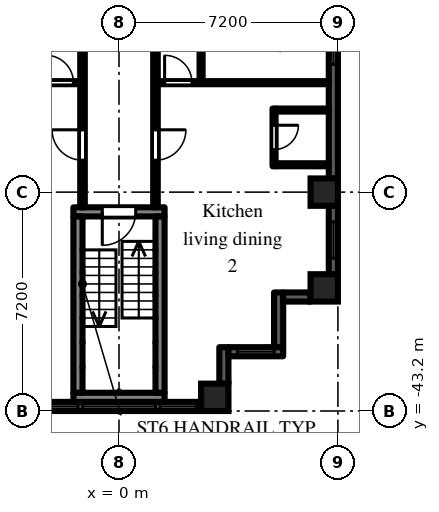
"""IFC4 building model, lengths in metres.
Left out: names, types, materials, properties, quantities, classifications, styles, units other than length and angle.
Written with IfcOpenShell. Run it as: python <this file> out.ifc"""

import sys

from ifc_helpers import new_model, si_unit, direction, frame, frame_2d, origin, origin_2d, place, context, subcontext, project, spatial, rectangle, extrude, element, fill, save


model = new_model("IFC4")
c1 = context("Model", 3, precision=1e-05, world=origin(), true_north=direction((0.0, 1.0)))
c2 = subcontext(c1, "Body", "Model", "MODEL_VIEW")
j1 = project(units=[si_unit("LENGTHUNIT", "METRE"), si_unit("PLANEANGLEUNIT", "RADIAN")], contexts=[c1])
p1 = place(None, origin())
s1 = spatial("IfcSite", under=j1, at=p1, CompositionType="ELEMENT")
p2 = place(p1, origin())
s2 = spatial("IfcBuilding", under=s1, at=p2, CompositionType="ELEMENT")
p3 = place(p2, frame((0.0, 0.0, 53.7)))
s3 = spatial("IfcBuildingStorey", under=s2, at=p3, CompositionType="ELEMENT", Elevation=53.7)
for number, where, z_axis, x_axis in (
    (1, (3.15, -42.75, 0.0), (0.0, 0.0, 1.0), (1.0, 0.0, 0.0)),
    (2, (6.75, -39.15, 0.0), (0.0, 0.0, 1.0), (1.0, 0.0, 0.0)),
    (3, (6.75, -36.0, 0.0), (0.0, 0.0, 1.0), (1.0, 0.0, 0.0)),
):
    element("IfcColumn", number, at=place(p3, frame(where, z_axis=z_axis, x_axis=x_axis)), inside=s3, PredefinedType="COLUMN", context=c2, shape_type="SweptSolid", body=[
        extrude(rectangle(XDim=0.9, YDim=0.9, at=origin_2d()), origin(), (0.0, 0.0, 1.0), 3.0),
    ])
p4 = place(p3, frame((-2.7, -43.05, 0.0), z_axis=(0.0, 0.0, 1.0), x_axis=(1.0, 0.0, 0.0)))
e4 = element("IfcWall", 4, at=p4, inside=s3, PredefinedType="SOLIDWALL", context=c2, shape_type="SweptSolid", body=[
    extrude(rectangle(XDim=5.4, YDim=0.3, at=frame_2d((2.7, 0.0))), origin(), (0.0, 0.0, 1.0), 2.1),
])
p5 = place(p4, frame((1.5, 0.0, 0.2)))
e5 = element("IfcOpeningElement", 5, at=p5, cuts=e4, PredefinedType="OPENING", context=c2, shape_type="SweptSolid", body=[
    extrude(rectangle(XDim=2.4, YDim=1.85, at=frame_2d((1.2, 0.925))), frame((0.0, 0.16, 0.0), z_axis=(0.0, -1.0, 0.0), x_axis=(1.0, 0.0, 0.0)), (0.0, 0.0, 1.0), 0.32),
])
p6 = place(p4, frame((0.15, 0.0, 0.2)))
e6 = element("IfcOpeningElement", 6, at=p6, cuts=e4, PredefinedType="OPENING", context=c2, shape_type="SweptSolid", body=[
    extrude(rectangle(XDim=1.2, YDim=1.85, at=frame_2d((0.6, 0.925))), frame((0.0, 0.16, 0.0), z_axis=(0.0, -1.0, 0.0), x_axis=(1.0, 0.0, 0.0)), (0.0, 0.0, 1.0), 0.32),
])
p7 = place(p4, frame((4.05, 0.0, 0.2)))
e7 = element("IfcOpeningElement", 7, at=p7, cuts=e4, PredefinedType="OPENING", context=c2, shape_type="SweptSolid", body=[
    extrude(rectangle(XDim=1.2, YDim=1.85, at=frame_2d((0.6, 0.925))), frame((0.0, 0.16, 0.0), z_axis=(0.0, -1.0, 0.0), x_axis=(1.0, 0.0, 0.0)), (0.0, 0.0, 1.0), 0.32),
])
p8 = place(p3, frame((3.45, -42.3, 0.0), z_axis=(0.0, 0.0, 1.0), x_axis=(0.0, 1.0, 0.0)))
e8 = element("IfcWall", 8, at=p8, inside=s3, PredefinedType="SOLIDWALL", context=c2, shape_type="SweptSolid", body=[
    extrude(rectangle(XDim=1.2, YDim=0.3, at=frame_2d((0.6, 0.0))), origin(), (0.0, 0.0, 1.0), 2.575),
])
p9 = place(p3, frame((3.6, -41.25, 0.0), z_axis=(0.0, 0.0, 1.0), x_axis=(1.0, 0.0, 0.0)))
e9 = element("IfcWall", 9, at=p9, inside=s3, PredefinedType="SOLIDWALL", context=c2, shape_type="SweptSolid", body=[
    extrude(rectangle(XDim=1.8, YDim=0.3, at=frame_2d((0.9, 0.0))), origin(), (0.0, 0.0, 1.0), 2.575),
])
p10 = place(p9, frame((0.3, 0.0, 0.2)))
e10 = element("IfcOpeningElement", 10, at=p10, cuts=e9, PredefinedType="OPENING", context=c2, shape_type="SweptSolid", body=[
    extrude(rectangle(XDim=1.2, YDim=1.85, at=frame_2d((0.6, 0.925))), frame((0.0, 0.16, 0.0), z_axis=(0.0, -1.0, 0.0), x_axis=(1.0, 0.0, 0.0)), (0.0, 0.0, 1.0), 0.32),
])
p11 = place(p3, frame((5.25, -41.1, 0.0), z_axis=(0.0, 0.0, 1.0), x_axis=(0.0, 1.0, 0.0)))
e11 = element("IfcWall", 11, at=p11, inside=s3, PredefinedType="SOLIDWALL", context=c2, shape_type="SweptSolid", body=[
    extrude(rectangle(XDim=1.8, YDim=0.3, at=frame_2d((0.9, 0.0))), origin(), (0.0, 0.0, 1.0), 2.575),
])
p12 = place(p3, frame((5.4, -39.45, 0.0), z_axis=(0.0, 0.0, 1.0), x_axis=(1.0, 0.0, 0.0)))
e12 = element("IfcWall", 12, at=p12, inside=s3, PredefinedType="SOLIDWALL", context=c2, shape_type="SweptSolid", body=[
    extrude(rectangle(XDim=0.9, YDim=0.3, at=frame_2d((0.45, 0.0))), origin(), (0.0, 0.0, 1.0), 2.575),
])
p13 = place(p3, frame((7.05, -38.7, 0.0), z_axis=(0.0, 0.0, 1.0), x_axis=(0.0, 1.0, 0.0)))
e13 = element("IfcWall", 13, at=p13, inside=s3, PredefinedType="SOLIDWALL", context=c2, shape_type="SweptSolid", body=[
    extrude(rectangle(XDim=2.25, YDim=0.3, at=frame_2d((1.125, 0.0))), origin(), (0.0, 0.0, 1.0), 2.1),
])
p14 = place(p13, frame((0.525, 0.0, 0.2)))
e14 = element("IfcOpeningElement", 14, at=p14, cuts=e13, PredefinedType="OPENING", context=c2, shape_type="SweptSolid", body=[
    extrude(rectangle(XDim=1.2, YDim=1.85, at=frame_2d((0.6, 0.925))), frame((0.0, 0.16, 0.0), z_axis=(0.0, -1.0, 0.0), x_axis=(1.0, 0.0, 0.0)), (0.0, 0.0, 1.0), 0.32),
])
p15 = place(p3, frame((7.05, -35.55, 0.0), z_axis=(0.0, 0.0, 1.0), x_axis=(0.0, 1.0, 0.0)))
e15 = element("IfcWall", 15, at=p15, inside=s3, PredefinedType="SOLIDWALL", context=c2, shape_type="SweptSolid", body=[
    extrude(rectangle(XDim=6.3, YDim=0.3, at=frame_2d((3.15, 0.0))), origin(), (0.0, 0.0, 1.0), 2.1),
])
p16 = place(p15, frame((3.75, 0.0, 0.2)))
e16 = element("IfcOpeningElement", 16, at=p16, cuts=e15, PredefinedType="OPENING", context=c2, shape_type="SweptSolid", body=[
    extrude(rectangle(XDim=2.4, YDim=1.85, at=frame_2d((1.2, 0.925))), frame((0.0, 0.16, 0.0), z_axis=(0.0, -1.0, 0.0), x_axis=(1.0, 0.0, 0.0)), (0.0, 0.0, 1.0), 0.32),
])
p17 = place(p3, frame((-1.5, -36.65, 0.0), z_axis=(0.0, 0.0, 1.0), x_axis=(1.0, 0.0, 0.0)))
e17 = element("IfcWall", 17, at=p17, inside=s3, PredefinedType="SHEAR", context=c2, shape_type="SweptSolid", body=[
    extrude(rectangle(XDim=3.0, YDim=0.3, at=frame_2d((1.5, 0.0))), origin(), (0.0, 0.0, 1.0), 2.575),
])
p18 = place(p17, frame((0.95, 0.0, 0.0)))
e18 = element("IfcOpeningElement", 18, at=p18, cuts=e17, PredefinedType="OPENING", context=c2, shape_type="SweptSolid", body=[
    extrude(rectangle(XDim=1.1, YDim=2.1, at=frame_2d((0.55, 1.05))), frame((0.0, 0.16, 0.0), z_axis=(0.0, -1.0, 0.0), x_axis=(1.0, 0.0, 0.0)), (0.0, 0.0, 1.0), 0.32),
])
p19 = place(p3, frame((-1.5, -42.75, 0.0), z_axis=(0.0, 0.0, 1.0), x_axis=(1.0, 0.0, 0.0)))
e19 = element("IfcWall", 19, at=p19, inside=s3, PredefinedType="SHEAR", context=c2, shape_type="SweptSolid", body=[
    extrude(rectangle(XDim=3.0, YDim=0.3, at=frame_2d((1.5, 0.0))), origin(), (0.0, 0.0, 1.0), 2.575),
])
for number, where, z_axis, x_axis in (
    (20, (-1.35, -36.8, 0.0), (0.0, 0.0, 1.0), (0.0, -1.0, 0.0)),
    (21, (1.35, -36.8, 0.0), (0.0, 0.0, 1.0), (0.0, -1.0, 0.0)),
):
    element("IfcWall", number, at=place(p3, frame(where, z_axis=z_axis, x_axis=x_axis)), inside=s3, PredefinedType="SHEAR", context=c2, shape_type="SweptSolid", body=[
        extrude(rectangle(XDim=5.8, YDim=0.3, at=frame_2d((2.9, 0.0))), origin(), (0.0, 0.0, 1.0), 2.575),
    ])
p20 = place(p3, frame((-6.9, -32.4, 0.0), z_axis=(0.0, 0.0, 1.0), x_axis=(1.0, 0.0, 0.0)))
e22 = element("IfcWall", 22, at=p20, inside=s3, PredefinedType="PARTITIONING", context=c2, shape_type="SweptSolid", body=[
    extrude(rectangle(XDim=5.625, YDim=0.1, at=frame_2d((2.812, 0.0))), origin(), (0.0, 0.0, 1.0), 2.575),
])
p21 = place(p20, frame((4.5, 0.0, 0.0)))
e23 = element("IfcOpeningElement", 23, at=p21, cuts=e22, PredefinedType="OPENING", context=c2, shape_type="SweptSolid", body=[
    extrude(rectangle(XDim=0.9, YDim=2.1, at=frame_2d((0.45, 1.05))), frame((0.0, 0.06, 0.0), z_axis=(0.0, -1.0, 0.0), x_axis=(1.0, 0.0, 0.0)), (0.0, 0.0, 1.0), 0.12),
])
p22 = place(p3, frame((-1.2, -36.5, 0.0), z_axis=(0.0, 0.0, 1.0), x_axis=(0.0, 1.0, 0.0)))
e24 = element("IfcWall", 24, at=p22, inside=s3, PredefinedType="PARTITIONING", context=c2, shape_type="SweptSolid", body=[
    extrude(rectangle(XDim=35.225, YDim=0.15, at=frame_2d((17.613, 0.0))), origin(), (0.0, 0.0, 1.0), 2.575),
])
p23 = place(p22, frame((31.85, 0.0, 0.0)))
e25 = element("IfcOpeningElement", 25, at=p23, cuts=e24, PredefinedType="OPENING", context=c2, shape_type="SweptSolid", body=[
    extrude(rectangle(XDim=0.9, YDim=2.1, at=frame_2d((0.45, 1.05))), frame((0.0, 0.085, 0.0), z_axis=(0.0, -1.0, 0.0), x_axis=(1.0, 0.0, 0.0)), (0.0, 0.0, 1.0), 0.17),
])
p24 = place(p22, frame((23.05, 0.0, 0.0)))
e26 = element("IfcOpeningElement", 26, at=p24, cuts=e24, PredefinedType="OPENING", context=c2, shape_type="SweptSolid", body=[
    extrude(rectangle(XDim=0.9, YDim=2.1, at=frame_2d((0.45, 1.05))), frame((0.0, 0.085, 0.0), z_axis=(0.0, -1.0, 0.0), x_axis=(1.0, 0.0, 0.0)), (0.0, 0.0, 1.0), 0.17),
])
p25 = place(p22, frame((26.65, 0.0, 0.0)))
e27 = element("IfcOpeningElement", 27, at=p25, cuts=e24, PredefinedType="OPENING", context=c2, shape_type="SweptSolid", body=[
    extrude(rectangle(XDim=0.9, YDim=2.1, at=frame_2d((0.45, 1.05))), frame((0.0, 0.085, 0.0), z_axis=(0.0, -1.0, 0.0), x_axis=(1.0, 0.0, 0.0)), (0.0, 0.0, 1.0), 0.17),
])
p26 = place(p22, frame((20.9, 0.0, 0.0)))
e28 = element("IfcOpeningElement", 28, at=p26, cuts=e24, PredefinedType="OPENING", context=c2, shape_type="SweptSolid", body=[
    extrude(rectangle(XDim=1.0, YDim=2.1, at=frame_2d((0.5, 1.05))), frame((0.0, 0.085, 0.0), z_axis=(0.0, -1.0, 0.0), x_axis=(1.0, 0.0, 0.0)), (0.0, 0.0, 1.0), 0.17),
])
p27 = place(p22, frame((1.55, 0.0, 0.0)))
e29 = element("IfcOpeningElement", 29, at=p27, cuts=e24, PredefinedType="OPENING", context=c2, shape_type="SweptSolid", body=[
    extrude(rectangle(XDim=1.0, YDim=2.1, at=frame_2d((0.5, 1.05))), frame((0.0, 0.085, 0.0), z_axis=(0.0, -1.0, 0.0), x_axis=(1.0, 0.0, 0.0)), (0.0, 0.0, 1.0), 0.17),
])
p28 = place(p3, frame((1.2, -36.5, 0.0), z_axis=(0.0, 0.0, 1.0), x_axis=(0.0, 1.0, 0.0)))
e30 = element("IfcWall", 30, at=p28, inside=s3, PredefinedType="PARTITIONING", context=c2, shape_type="SweptSolid", body=[
    extrude(rectangle(XDim=35.375, YDim=0.15, at=frame_2d((17.688, 0.0))), origin(), (0.0, 0.0, 1.0), 2.575),
])
p29 = place(p28, frame((33.65, 0.0, 0.0)))
e31 = element("IfcOpeningElement", 31, at=p29, cuts=e30, PredefinedType="OPENING", context=c2, shape_type="SweptSolid", body=[
    extrude(rectangle(XDim=0.9, YDim=2.1, at=frame_2d((0.45, 1.05))), frame((0.0, 0.085, 0.0), z_axis=(0.0, -1.0, 0.0), x_axis=(1.0, 0.0, 0.0)), (0.0, 0.0, 1.0), 0.17),
])
p30 = place(p28, frame((30.65, 0.0, 0.0)))
e32 = element("IfcOpeningElement", 32, at=p30, cuts=e30, PredefinedType="OPENING", context=c2, shape_type="SweptSolid", body=[
    extrude(rectangle(XDim=0.9, YDim=2.1, at=frame_2d((0.45, 1.05))), frame((0.0, 0.085, 0.0), z_axis=(0.0, -1.0, 0.0), x_axis=(1.0, 0.0, 0.0)), (0.0, 0.0, 1.0), 0.17),
])
p31 = place(p28, frame((27.45, 0.0, 0.0)))
e33 = element("IfcOpeningElement", 33, at=p31, cuts=e30, PredefinedType="OPENING", context=c2, shape_type="SweptSolid", body=[
    extrude(rectangle(XDim=0.9, YDim=2.1, at=frame_2d((0.45, 1.05))), frame((0.0, 0.085, 0.0), z_axis=(0.0, -1.0, 0.0), x_axis=(1.0, 0.0, 0.0)), (0.0, 0.0, 1.0), 0.17),
])
p32 = place(p28, frame((23.85, 0.0, 0.0)))
e34 = element("IfcOpeningElement", 34, at=p32, cuts=e30, PredefinedType="OPENING", context=c2, shape_type="SweptSolid", body=[
    extrude(rectangle(XDim=0.9, YDim=2.1, at=frame_2d((0.45, 1.05))), frame((0.0, 0.085, 0.0), z_axis=(0.0, -1.0, 0.0), x_axis=(1.0, 0.0, 0.0)), (0.0, 0.0, 1.0), 0.17),
])
p33 = place(p28, frame((20.75, 0.0, 0.0)))
e35 = element("IfcOpeningElement", 35, at=p33, cuts=e30, PredefinedType="OPENING", context=c2, shape_type="SweptSolid", body=[
    extrude(rectangle(XDim=0.9, YDim=2.1, at=frame_2d((0.45, 1.05))), frame((0.0, 0.085, 0.0), z_axis=(0.0, -1.0, 0.0), x_axis=(1.0, 0.0, 0.0)), (0.0, 0.0, 1.0), 0.17),
])
p34 = place(p28, frame((18.95, 0.0, 0.0)))
e36 = element("IfcOpeningElement", 36, at=p34, cuts=e30, PredefinedType="OPENING", context=c2, shape_type="SweptSolid", body=[
    extrude(rectangle(XDim=0.9, YDim=2.1, at=frame_2d((0.45, 1.05))), frame((0.0, 0.085, 0.0), z_axis=(0.0, -1.0, 0.0), x_axis=(1.0, 0.0, 0.0)), (0.0, 0.0, 1.0), 0.17),
])
p35 = place(p28, frame((1.55, 0.0, 0.0)))
e37 = element("IfcOpeningElement", 37, at=p35, cuts=e30, PredefinedType="OPENING", context=c2, shape_type="SweptSolid", body=[
    extrude(rectangle(XDim=1.0, YDim=2.1, at=frame_2d((0.5, 1.05))), frame((0.0, 0.085, 0.0), z_axis=(0.0, -1.0, 0.0), x_axis=(1.0, 0.0, 0.0)), (0.0, 0.0, 1.0), 0.17),
])
p36 = place(p3, frame((1.275, -32.4, 0.0), z_axis=(0.0, 0.0, 1.0), x_axis=(1.0, 0.0, 0.0)))
e38 = element("IfcWall", 38, at=p36, inside=s3, PredefinedType="PARTITIONING", context=c2, shape_type="SweptSolid", body=[
    extrude(rectangle(XDim=5.625, YDim=0.1, at=frame_2d((2.812, 0.0))), origin(), (0.0, 0.0, 1.0), 2.575),
])
p37 = place(p36, frame((0.225, 0.0, 0.0)))
e39 = element("IfcOpeningElement", 39, at=p37, cuts=e38, PredefinedType="OPENING", context=c2, shape_type="SweptSolid", body=[
    extrude(rectangle(XDim=0.9, YDim=2.1, at=frame_2d((0.45, 1.05))), frame((0.0, 0.06, 0.0), z_axis=(0.0, -1.0, 0.0), x_axis=(1.0, 0.0, 0.0)), (0.0, 0.0, 1.0), 0.12),
])
p38 = place(p3, frame((2.7, -32.35, 0.0), z_axis=(0.0, 0.0, 1.0), x_axis=(0.0, 1.0, 0.0)))
e40 = element("IfcWall", 40, at=p38, inside=s3, PredefinedType="PARTITIONING", context=c2, shape_type="SweptSolid", body=[
    extrude(rectangle(XDim=14.275, YDim=0.1, at=frame_2d((7.138, 0.0))), origin(), (0.0, 0.0, 1.0), 2.575),
])
p39 = place(p38, frame((1.12, 0.0, 0.0)))
e41 = element("IfcOpeningElement", 41, at=p39, cuts=e40, PredefinedType="OPENING", context=c2, shape_type="SweptSolid", body=[
    extrude(rectangle(XDim=0.9, YDim=2.1, at=frame_2d((0.45, 1.05))), frame((0.0, 0.06, 0.0), z_axis=(0.0, -1.0, 0.0), x_axis=(1.0, 0.0, 0.0)), (0.0, 0.0, 1.0), 0.12),
])
p40 = place(p38, frame((12.28, 0.0, 0.0)))
e42 = element("IfcOpeningElement", 42, at=p40, cuts=e40, PredefinedType="OPENING", context=c2, shape_type="SweptSolid", body=[
    extrude(rectangle(XDim=0.9, YDim=2.1, at=frame_2d((0.45, 1.05))), frame((0.0, 0.06, 0.0), z_axis=(0.0, -1.0, 0.0), x_axis=(1.0, 0.0, 0.0)), (0.0, 0.0, 1.0), 0.12),
])
p41 = place(p3, frame((5.1, -35.15, 0.0), z_axis=(0.0, 0.0, 1.0), x_axis=(0.0, 1.0, 0.0)))
e43 = element("IfcWall", 43, at=p41, inside=s3, PredefinedType="PARTITIONING", context=c2, shape_type="SweptSolid", body=[
    extrude(rectangle(XDim=1.9, YDim=0.1, at=frame_2d((0.95, 0.0))), origin(), (0.0, 0.0, 1.0), 2.575),
])
p42 = place(p41, frame((0.55, 0.0, 0.0)))
e44 = element("IfcOpeningElement", 44, at=p42, cuts=e43, PredefinedType="OPENING", context=c2, shape_type="SweptSolid", body=[
    extrude(rectangle(XDim=0.8, YDim=2.1, at=frame_2d((0.4, 1.05))), frame((0.0, 0.06, 0.0), z_axis=(0.0, -1.0, 0.0), x_axis=(1.0, 0.0, 0.0)), (0.0, 0.0, 1.0), 0.12),
])
for number, where, z_axis, x_axis in (
    (45, (5.15, -35.1, 0.0), (0.0, 0.0, 1.0), (1.0, 0.0, 0.0)),
    (46, (5.15, -33.3, 0.0), (0.0, 0.0, 1.0), (1.0, 0.0, 0.0)),
):
    element("IfcWall", number, at=place(p3, frame(where, z_axis=z_axis, x_axis=x_axis)), inside=s3, PredefinedType="PARTITIONING", context=c2, shape_type="SweptSolid", body=[
        extrude(rectangle(XDim=1.75, YDim=0.1, at=frame_2d((0.875, 0.0))), origin(), (0.0, 0.0, 1.0), 2.575),
    ])
p43 = place(p5, origin())
e47 = element("IfcWindow", 47, at=p43, inside=s3, PartitioningType="SINGLE_PANEL", PredefinedType="WINDOW", context=c2, shape_type="SweptSolid", body=[
    extrude(rectangle(XDim=2.4, YDim=1.85, at=frame_2d((1.2, 0.925))), frame((0.0, 0.03, 0.0), z_axis=(0.0, -1.0, 0.0), x_axis=(1.0, 0.0, 0.0)), (0.0, 0.0, 1.0), 0.06),
])
fill(e5, e47)
p44 = place(p6, origin())
e48 = element("IfcWindow", 48, at=p44, inside=s3, PartitioningType="SINGLE_PANEL", PredefinedType="WINDOW", context=c2, shape_type="SweptSolid", body=[
    extrude(rectangle(XDim=1.2, YDim=1.85, at=frame_2d((0.6, 0.925))), frame((0.0, 0.03, 0.0), z_axis=(0.0, -1.0, 0.0), x_axis=(1.0, 0.0, 0.0)), (0.0, 0.0, 1.0), 0.06),
])
fill(e6, e48)
p45 = place(p7, origin())
e49 = element("IfcWindow", 49, at=p45, inside=s3, PartitioningType="SINGLE_PANEL", PredefinedType="WINDOW", context=c2, shape_type="SweptSolid", body=[
    extrude(rectangle(XDim=1.2, YDim=1.85, at=frame_2d((0.6, 0.925))), frame((0.0, 0.03, 0.0), z_axis=(0.0, -1.0, 0.0), x_axis=(1.0, 0.0, 0.0)), (0.0, 0.0, 1.0), 0.06),
])
fill(e7, e49)
p46 = place(p10, origin())
e50 = element("IfcWindow", 50, at=p46, inside=s3, PartitioningType="SINGLE_PANEL", PredefinedType="WINDOW", context=c2, shape_type="SweptSolid", body=[
    extrude(rectangle(XDim=1.2, YDim=1.85, at=frame_2d((0.6, 0.925))), frame((0.0, 0.03, 0.0), z_axis=(0.0, -1.0, 0.0), x_axis=(1.0, 0.0, 0.0)), (0.0, 0.0, 1.0), 0.06),
])
fill(e10, e50)
p47 = place(p14, origin())
e51 = element("IfcWindow", 51, at=p47, inside=s3, PartitioningType="SINGLE_PANEL", PredefinedType="WINDOW", context=c2, shape_type="SweptSolid", body=[
    extrude(rectangle(XDim=1.2, YDim=1.85, at=frame_2d((0.6, 0.925))), frame((0.0, 0.03, 0.0), z_axis=(0.0, -1.0, 0.0), x_axis=(1.0, 0.0, 0.0)), (0.0, 0.0, 1.0), 0.06),
])
fill(e14, e51)
p48 = place(p16, origin())
e52 = element("IfcWindow", 52, at=p48, inside=s3, PartitioningType="SINGLE_PANEL", PredefinedType="WINDOW", context=c2, shape_type="SweptSolid", body=[
    extrude(rectangle(XDim=2.4, YDim=1.85, at=frame_2d((1.2, 0.925))), frame((0.0, 0.03, 0.0), z_axis=(0.0, -1.0, 0.0), x_axis=(1.0, 0.0, 0.0)), (0.0, 0.0, 1.0), 0.06),
])
fill(e16, e52)
p49 = place(p18, frame((1.1, 0.0, 0.0), z_axis=(0.0, 0.0, 1.0), x_axis=(-1.0, 0.0, 0.0)))
e53 = element("IfcDoor", 53, at=p49, inside=s3, OperationType="SINGLE_SWING_RIGHT", PredefinedType="DOOR", context=c2, shape_type="SweptSolid", body=[
    extrude(rectangle(XDim=1.1, YDim=2.1, at=frame_2d((0.55, 1.05))), frame((0.0, 0.025, 0.0), z_axis=(0.0, -1.0, 0.0), x_axis=(1.0, 0.0, 0.0)), (0.0, 0.0, 1.0), 0.05),
])
fill(e18, e53)
p50 = place(p42, frame((0.8, 0.0, 0.0), z_axis=(0.0, 0.0, 1.0), x_axis=(-1.0, 0.0, 0.0)))
e54 = element("IfcDoor", 54, at=p50, inside=s3, OperationType="SINGLE_SWING_LEFT", PredefinedType="DOOR", context=c2, shape_type="SweptSolid", body=[
    extrude(rectangle(XDim=0.8, YDim=2.1, at=frame_2d((0.4, 1.05))), frame((0.0, 0.025, 0.0), z_axis=(0.0, -1.0, 0.0), x_axis=(1.0, 0.0, 0.0)), (0.0, 0.0, 1.0), 0.05),
])
fill(e44, e54)
p51 = place(p35, frame((1.0, 0.0, 0.0), z_axis=(0.0, 0.0, 1.0), x_axis=(-1.0, 0.0, 0.0)))
e55 = element("IfcDoor", 55, at=p51, inside=s3, OperationType="SINGLE_SWING_LEFT", PredefinedType="DOOR", context=c2, shape_type="SweptSolid", body=[
    extrude(rectangle(XDim=1.0, YDim=2.1, at=frame_2d((0.5, 1.05))), frame((0.0, 0.025, 0.0), z_axis=(0.0, -1.0, 0.0), x_axis=(1.0, 0.0, 0.0)), (0.0, 0.0, 1.0), 0.05),
])
fill(e37, e55)
p52 = place(p37, origin())
e56 = element("IfcDoor", 56, at=p52, inside=s3, OperationType="SINGLE_SWING_LEFT", PredefinedType="DOOR", context=c2, shape_type="SweptSolid", body=[
    extrude(rectangle(XDim=0.9, YDim=2.1, at=frame_2d((0.45, 1.05))), frame((0.0, 0.025, 0.0), z_axis=(0.0, -1.0, 0.0), x_axis=(1.0, 0.0, 0.0)), (0.0, 0.0, 1.0), 0.05),
])
fill(e39, e56)
p53 = place(p27, origin())
e57 = element("IfcDoor", 57, at=p53, inside=s3, OperationType="SINGLE_SWING_RIGHT", PredefinedType="DOOR", context=c2, shape_type="SweptSolid", body=[
    extrude(rectangle(XDim=1.0, YDim=2.1, at=frame_2d((0.5, 1.05))), frame((0.0, 0.025, 0.0), z_axis=(0.0, -1.0, 0.0), x_axis=(1.0, 0.0, 0.0)), (0.0, 0.0, 1.0), 0.05),
])
fill(e29, e57)
p54 = place(p21, origin())
e58 = element("IfcDoor", 58, at=p54, inside=s3, OperationType="SINGLE_SWING_LEFT", PredefinedType="DOOR", context=c2, shape_type="SweptSolid", body=[
    extrude(rectangle(XDim=0.9, YDim=2.1, at=frame_2d((0.45, 1.05))), frame((0.0, 0.025, 0.0), z_axis=(0.0, -1.0, 0.0), x_axis=(1.0, 0.0, 0.0)), (0.0, 0.0, 1.0), 0.05),
])
fill(e23, e58)
save(model, sys.argv[1])
